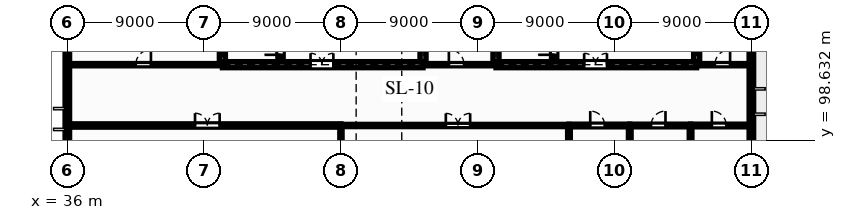
"""IFC4 building model, lengths in metres.
Left out: names, types, materials, properties, quantities, classifications, styles, units other than length and angle.
Written with IfcOpenShell. Run it as: python <this file> out.ifc"""

import sys

from ifc_helpers import new_model, si_unit, direction, frame, frame_2d, origin, place, context, subcontext, project, spatial, rectangle, extrude, element, fill, save


model = new_model("IFC4")
c1 = context("Model", 3, precision=1e-05, world=origin(), true_north=direction((0.0, 1.0)))
c2 = subcontext(c1, "Body", "Model", "MODEL_VIEW")
j1 = project(units=[si_unit("LENGTHUNIT", "METRE"), si_unit("PLANEANGLEUNIT", "RADIAN")], contexts=[c1])
p1 = place(None, origin())
s1 = spatial("IfcSite", under=j1, at=p1, CompositionType="ELEMENT")
p2 = place(p1, origin())
s2 = spatial("IfcBuilding", under=s1, at=p2, CompositionType="ELEMENT")
p3 = place(p2, frame((0.0, 0.0, 16.52)))
s3 = spatial("IfcBuildingStorey", under=s2, at=p3, CompositionType="ELEMENT", Elevation=16.52)
p4 = place(p3, frame((36.0, 90.0, 0.0), z_axis=(0.0, 0.0, 1.0), x_axis=(0.0, 1.0, 0.0)))
e1 = element("IfcWall", 1, at=p4, inside=s3, PredefinedType="SOLIDWALL", context=c2, shape_type="SweptSolid", body=[
    extrude(rectangle(XDim=24.0, YDim=0.3, at=frame_2d((12.0, 0.0))), origin(), (0.0, 0.0, 1.0), 2.785),
])
p5 = place(p4, frame((3.0, 0.0, 0.815)))
e2 = element("IfcOpeningElement", 2, at=p5, cuts=e1, PredefinedType="OPENING", context=c2, shape_type="SweptSolid", body=[
    extrude(rectangle(XDim=1.35, YDim=1.85, at=frame_2d((0.675, 0.925))), frame((0.0, 0.16, 0.0), z_axis=(0.0, -1.0, 0.0), x_axis=(1.0, 0.0, 0.0)), (0.0, 0.0, 1.0), 0.32),
])
p6 = place(p4, frame((11.7, 0.0, 0.915)))
e3 = element("IfcOpeningElement", 3, at=p6, cuts=e1, PredefinedType="OPENING", context=c2, shape_type="SweptSolid", body=[
    extrude(rectangle(XDim=1.05, YDim=1.75, at=frame_2d((0.525, 0.875))), frame((0.0, 0.16, 0.0), z_axis=(0.0, -1.0, 0.0), x_axis=(1.0, 0.0, 0.0)), (0.0, 0.0, 1.0), 0.32),
])
p7 = place(p4, frame((16.5, 0.0, 0.565)))
e4 = element("IfcOpeningElement", 4, at=p7, cuts=e1, PredefinedType="OPENING", context=c2, shape_type="SweptSolid", body=[
    extrude(rectangle(XDim=1.5, YDim=2.1, at=frame_2d((0.75, 1.05))), frame((0.0, 0.16, 0.0), z_axis=(0.0, -1.0, 0.0), x_axis=(1.0, 0.0, 0.0)), (0.0, 0.0, 1.0), 0.32),
])
p8 = place(p3, frame((81.0, 90.0, 0.0), z_axis=(0.0, 0.0, 1.0), x_axis=(0.0, 1.0, 0.0)))
e5 = element("IfcWall", 5, at=p8, inside=s3, PredefinedType="SOLIDWALL", context=c2, shape_type="SweptSolid", body=[
    extrude(rectangle(XDim=24.0, YDim=0.3, at=frame_2d((12.0, 0.0))), origin(), (0.0, 0.0, 1.0), 2.65),
])
p9 = place(p8, frame((3.2, 0.0, 0.43)))
e6 = element("IfcOpeningElement", 6, at=p9, cuts=e5, PredefinedType="OPENING", context=c2, shape_type="SweptSolid", body=[
    extrude(rectangle(XDim=1.5, YDim=2.1, at=frame_2d((0.75, 1.05))), frame((0.0, 0.16, 0.0), z_axis=(0.0, -1.0, 0.0), x_axis=(1.0, 0.0, 0.0)), (0.0, 0.0, 1.0), 0.32),
])
p10 = place(p8, frame((10.5, 0.0, 0.68)))
e7 = element("IfcOpeningElement", 7, at=p10, cuts=e5, PredefinedType="OPENING", context=c2, shape_type="SweptSolid", body=[
    extrude(rectangle(XDim=1.35, YDim=1.85, at=frame_2d((0.675, 0.925))), frame((0.0, 0.16, 0.0), z_axis=(0.0, -1.0, 0.0), x_axis=(1.0, 0.0, 0.0)), (0.0, 0.0, 1.0), 0.32),
])
p11 = place(p3, frame((46.2, 103.6, 0.0), z_axis=(0.0, 0.0, 1.0), x_axis=(1.0, 0.0, 0.0)))
e8 = element("IfcWall", 8, at=p11, inside=s3, PredefinedType="SHEAR", context=c2, shape_type="SweptSolid", body=[
    extrude(rectangle(XDim=13.2, YDim=0.4, at=frame_2d((6.6, 0.0))), origin(), (0.0, 0.0, 1.0), 3.46),
])
p12 = place(p11, frame((5.8, 0.0, 0.0)))
e9 = element("IfcOpeningElement", 9, at=p12, cuts=e8, PredefinedType="OPENING", context=c2, shape_type="SweptSolid", body=[
    extrude(rectangle(XDim=1.5, YDim=2.2, at=frame_2d((0.75, 1.1))), frame((0.0, 0.21, 0.0), z_axis=(0.0, -1.0, 0.0), x_axis=(1.0, 0.0, 0.0)), (0.0, 0.0, 1.0), 0.42),
])
for number, where, z_axis, x_axis in (
    (10, (46.2, 103.8, 0.0), (0.0, 0.0, 1.0), (0.0, 1.0, 0.0)),
    (11, (59.4, 103.8, 0.0), (0.0, 0.0, 1.0), (0.0, 1.0, 0.0)),
):
    element("IfcWall", number, at=place(p3, frame(where, z_axis=z_axis, x_axis=x_axis)), inside=s3, PredefinedType="SHEAR", context=c2, shape_type="SweptSolid", body=[
        extrude(rectangle(XDim=10.01, YDim=0.4, at=frame_2d((5.005, 0.0))), origin(), (0.0, 0.0, 1.0), 3.46),
    ])
p13 = place(p3, frame((50.025, 103.8, 0.0), z_axis=(0.0, 0.0, 1.0), x_axis=(0.0, 1.0, 0.0)))
e12 = element("IfcWall", 12, at=p13, inside=s3, PredefinedType="SHEAR", context=c2, shape_type="SweptSolid", body=[
    extrude(rectangle(XDim=10.01, YDim=0.35, at=frame_2d((5.005, 0.0))), origin(), (0.0, 0.0, 1.0), 3.46),
])
p14 = place(p13, frame((0.45, 0.0, 0.0)))
e13 = element("IfcOpeningElement", 13, at=p14, cuts=e12, PredefinedType="OPENING", context=c2, shape_type="SweptSolid", body=[
    extrude(rectangle(XDim=1.05, YDim=2.2, at=frame_2d((0.525, 1.1))), frame((0.0, 0.185, 0.0), z_axis=(0.0, -1.0, 0.0), x_axis=(1.0, 0.0, 0.0)), (0.0, 0.0, 1.0), 0.37),
])
p15 = place(p3, frame((64.2, 103.6, 0.0), z_axis=(0.0, 0.0, 1.0), x_axis=(1.0, 0.0, 0.0)))
e14 = element("IfcWall", 14, at=p15, inside=s3, PredefinedType="SHEAR", context=c2, shape_type="SweptSolid", body=[
    extrude(rectangle(XDim=13.2, YDim=0.4, at=frame_2d((6.6, 0.0))), origin(), (0.0, 0.0, 1.0), 3.46),
])
p16 = place(p15, frame((5.8, 0.0, 0.0)))
e15 = element("IfcOpeningElement", 15, at=p16, cuts=e14, PredefinedType="OPENING", context=c2, shape_type="SweptSolid", body=[
    extrude(rectangle(XDim=1.5, YDim=2.2, at=frame_2d((0.75, 1.1))), frame((0.0, 0.21, 0.0), z_axis=(0.0, -1.0, 0.0), x_axis=(1.0, 0.0, 0.0)), (0.0, 0.0, 1.0), 0.42),
])
for number, where, z_axis, x_axis in (
    (16, (64.2, 103.8, 0.0), (0.0, 0.0, 1.0), (0.0, 1.0, 0.0)),
    (17, (77.4, 103.8, 0.0), (0.0, 0.0, 1.0), (0.0, 1.0, 0.0)),
):
    element("IfcWall", number, at=place(p3, frame(where, z_axis=z_axis, x_axis=x_axis)), inside=s3, PredefinedType="SHEAR", context=c2, shape_type="SweptSolid", body=[
        extrude(rectangle(XDim=10.01, YDim=0.4, at=frame_2d((5.005, 0.0))), origin(), (0.0, 0.0, 1.0), 3.46),
    ])
p17 = place(p3, frame((68.025, 103.8, 0.0), z_axis=(0.0, 0.0, 1.0), x_axis=(0.0, 1.0, 0.0)))
e18 = element("IfcWall", 18, at=p17, inside=s3, PredefinedType="SHEAR", context=c2, shape_type="SweptSolid", body=[
    extrude(rectangle(XDim=10.01, YDim=0.35, at=frame_2d((5.005, 0.0))), origin(), (0.0, 0.0, 1.0), 3.46),
])
p18 = place(p17, frame((0.45, 0.0, 0.0)))
e19 = element("IfcOpeningElement", 19, at=p18, cuts=e18, PredefinedType="OPENING", context=c2, shape_type="SweptSolid", body=[
    extrude(rectangle(XDim=1.05, YDim=2.2, at=frame_2d((0.525, 1.1))), frame((0.0, 0.185, 0.0), z_axis=(0.0, -1.0, 0.0), x_axis=(1.0, 0.0, 0.0)), (0.0, 0.0, 1.0), 0.37),
])
p19 = place(p3, frame((36.0, 99.6, 0.0), z_axis=(0.0, 0.0, 1.0), x_axis=(1.0, 0.0, 0.0)))
e20 = element("IfcWall", 20, at=p19, inside=s3, PredefinedType="PARTITIONING", context=c2, shape_type="SweptSolid", body=[
    extrude(rectangle(XDim=18.0, YDim=0.22, at=frame_2d((9.0, 0.0))), origin(), (0.0, 0.0, 1.0), 2.65),
])
p20 = place(p19, frame((8.4, 0.0, 0.0)))
e21 = element("IfcOpeningElement", 21, at=p20, cuts=e20, PredefinedType="OPENING", context=c2, shape_type="SweptSolid", body=[
    extrude(rectangle(XDim=1.62, YDim=2.22, at=frame_2d((0.81, 1.11))), frame((0.0, 0.12, 0.0), z_axis=(0.0, -1.0, 0.0), x_axis=(1.0, 0.0, 0.0)), (0.0, 0.0, 1.0), 0.24),
])
p21 = place(p3, frame((54.0, 99.6, 0.0), z_axis=(0.0, 0.0, 1.0), x_axis=(1.0, 0.0, 0.0)))
e22 = element("IfcWall", 22, at=p21, inside=s3, PredefinedType="PARTITIONING", context=c2, shape_type="SweptSolid", body=[
    extrude(rectangle(XDim=15.0, YDim=0.15, at=frame_2d((7.5, 0.0))), origin(), (0.0, 0.0, 1.0), 3.46),
])
p22 = place(p21, frame((6.9, 0.0, 0.0)))
e23 = element("IfcOpeningElement", 23, at=p22, cuts=e22, PredefinedType="OPENING", context=c2, shape_type="SweptSolid", body=[
    extrude(rectangle(XDim=1.6, YDim=2.2, at=frame_2d((0.8, 1.1))), frame((0.0, 0.085, 0.0), z_axis=(0.0, -1.0, 0.0), x_axis=(1.0, 0.0, 0.0)), (0.0, 0.0, 1.0), 0.17),
])
p23 = place(p3, frame((54.0, 90.0, 0.0), z_axis=(0.0, 0.0, 1.0), x_axis=(0.0, 1.0, 0.0)))
e24 = element("IfcWall", 24, at=p23, inside=s3, PredefinedType="PARTITIONING", context=c2, shape_type="SweptSolid", body=[
    extrude(rectangle(XDim=9.6, YDim=0.15, at=frame_2d((4.8, 0.0))), origin(), (0.0, 0.0, 1.0), 2.65),
])
p24 = place(p3, frame((69.0, 99.6, 0.0), z_axis=(0.0, 0.0, 1.0), x_axis=(1.0, 0.0, 0.0)))
e25 = element("IfcWall", 25, at=p24, inside=s3, PredefinedType="PLUMBINGWALL", context=c2, shape_type="SweptSolid", body=[
    extrude(rectangle(XDim=4.0, YDim=0.18, at=frame_2d((2.0, 0.0))), origin(), (0.0, 0.0, 1.0), 3.46),
])
p25 = place(p24, frame((1.4, 0.0, 0.0)))
e26 = element("IfcOpeningElement", 26, at=p25, cuts=e25, PredefinedType="OPENING", context=c2, shape_type="SweptSolid", body=[
    extrude(rectangle(XDim=0.95, YDim=2.15, at=frame_2d((0.475, 1.075))), frame((0.0, 0.1, 0.0), z_axis=(0.0, -1.0, 0.0), x_axis=(1.0, 0.0, 0.0)), (0.0, 0.0, 1.0), 0.2),
])
p26 = place(p3, frame((69.0, 90.0, 0.0), z_axis=(0.0, 0.0, 1.0), x_axis=(0.0, 1.0, 0.0)))
e27 = element("IfcWall", 27, at=p26, inside=s3, PredefinedType="PLUMBINGWALL", context=c2, shape_type="SweptSolid", body=[
    extrude(rectangle(XDim=9.6, YDim=0.18, at=frame_2d((4.8, 0.0))), origin(), (0.0, 0.0, 1.0), 3.46),
])
p27 = place(p3, frame((73.0, 99.6, 0.0), z_axis=(0.0, 0.0, 1.0), x_axis=(1.0, 0.0, 0.0)))
e28 = element("IfcWall", 28, at=p27, inside=s3, PredefinedType="PLUMBINGWALL", context=c2, shape_type="SweptSolid", body=[
    extrude(rectangle(XDim=4.0, YDim=0.18, at=frame_2d((2.0, 0.0))), origin(), (0.0, 0.0, 1.0), 3.46),
])
p28 = place(p27, frame((1.4, 0.0, 0.0)))
e29 = element("IfcOpeningElement", 29, at=p28, cuts=e28, PredefinedType="OPENING", context=c2, shape_type="SweptSolid", body=[
    extrude(rectangle(XDim=0.95, YDim=2.15, at=frame_2d((0.475, 1.075))), frame((0.0, 0.1, 0.0), z_axis=(0.0, -1.0, 0.0), x_axis=(1.0, 0.0, 0.0)), (0.0, 0.0, 1.0), 0.2),
])
p29 = place(p3, frame((73.0, 90.0, 0.0), z_axis=(0.0, 0.0, 1.0), x_axis=(0.0, 1.0, 0.0)))
e30 = element("IfcWall", 30, at=p29, inside=s3, PredefinedType="PLUMBINGWALL", context=c2, shape_type="SweptSolid", body=[
    extrude(rectangle(XDim=9.6, YDim=0.18, at=frame_2d((4.8, 0.0))), origin(), (0.0, 0.0, 1.0), 3.46),
])
p30 = place(p3, frame((77.0, 99.6, 0.0), z_axis=(0.0, 0.0, 1.0), x_axis=(1.0, 0.0, 0.0)))
e31 = element("IfcWall", 31, at=p30, inside=s3, PredefinedType="PLUMBINGWALL", context=c2, shape_type="SweptSolid", body=[
    extrude(rectangle(XDim=4.0, YDim=0.18, at=frame_2d((2.0, 0.0))), origin(), (0.0, 0.0, 1.0), 3.46),
])
p31 = place(p30, frame((1.4, 0.0, 0.0)))
e32 = element("IfcOpeningElement", 32, at=p31, cuts=e31, PredefinedType="OPENING", context=c2, shape_type="SweptSolid", body=[
    extrude(rectangle(XDim=0.95, YDim=2.15, at=frame_2d((0.475, 1.075))), frame((0.0, 0.1, 0.0), z_axis=(0.0, -1.0, 0.0), x_axis=(1.0, 0.0, 0.0)), (0.0, 0.0, 1.0), 0.2),
])
p32 = place(p3, frame((77.0, 90.0, 0.0), z_axis=(0.0, 0.0, 1.0), x_axis=(0.0, 1.0, 0.0)))
e33 = element("IfcWall", 33, at=p32, inside=s3, PredefinedType="PLUMBINGWALL", context=c2, shape_type="SweptSolid", body=[
    extrude(rectangle(XDim=9.6, YDim=0.18, at=frame_2d((4.8, 0.0))), origin(), (0.0, 0.0, 1.0), 3.46),
])
p33 = place(p3, frame((36.0, 103.6, 0.0), z_axis=(0.0, 0.0, 1.0), x_axis=(1.0, 0.0, 0.0)))
e34 = element("IfcWall", 34, at=p33, inside=s3, PredefinedType="PARTITIONING", context=c2, shape_type="SweptSolid", body=[
    extrude(rectangle(XDim=10.2, YDim=0.15, at=frame_2d((5.1, 0.0))), origin(), (0.0, 0.0, 1.0), 3.46),
])
p34 = place(p33, frame((4.5, 0.0, 0.0)))
e35 = element("IfcOpeningElement", 35, at=p34, cuts=e34, PredefinedType="OPENING", context=c2, shape_type="SweptSolid", body=[
    extrude(rectangle(XDim=1.0, YDim=2.15, at=frame_2d((0.5, 1.075))), frame((0.0, 0.085, 0.0), z_axis=(0.0, -1.0, 0.0), x_axis=(1.0, 0.0, 0.0)), (0.0, 0.0, 1.0), 0.17),
])
p35 = place(p3, frame((59.4, 103.6, 0.0), z_axis=(0.0, 0.0, 1.0), x_axis=(1.0, 0.0, 0.0)))
e36 = element("IfcWall", 36, at=p35, inside=s3, PredefinedType="PARTITIONING", context=c2, shape_type="SweptSolid", body=[
    extrude(rectangle(XDim=4.8, YDim=0.15, at=frame_2d((2.4, 0.0))), origin(), (0.0, 0.0, 1.0), 3.46),
])
p36 = place(p35, frame((1.7, 0.0, 0.0)))
e37 = element("IfcOpeningElement", 37, at=p36, cuts=e36, PredefinedType="OPENING", context=c2, shape_type="SweptSolid", body=[
    extrude(rectangle(XDim=1.0, YDim=2.15, at=frame_2d((0.5, 1.075))), frame((0.0, 0.085, 0.0), z_axis=(0.0, -1.0, 0.0), x_axis=(1.0, 0.0, 0.0)), (0.0, 0.0, 1.0), 0.17),
])
p37 = place(p3, frame((77.4, 103.6, 0.0), z_axis=(0.0, 0.0, 1.0), x_axis=(1.0, 0.0, 0.0)))
e38 = element("IfcWall", 38, at=p37, inside=s3, PredefinedType="PARTITIONING", context=c2, shape_type="SweptSolid", body=[
    extrude(rectangle(XDim=3.6, YDim=0.15, at=frame_2d((1.8, 0.0))), origin(), (0.0, 0.0, 1.0), 3.46),
])
p38 = place(p37, frame((1.2, 0.0, 0.0)))
e39 = element("IfcOpeningElement", 39, at=p38, cuts=e38, PredefinedType="OPENING", context=c2, shape_type="SweptSolid", body=[
    extrude(rectangle(XDim=1.0, YDim=2.15, at=frame_2d((0.5, 1.075))), frame((0.0, 0.085, 0.0), z_axis=(0.0, -1.0, 0.0), x_axis=(1.0, 0.0, 0.0)), (0.0, 0.0, 1.0), 0.17),
])
p39 = place(p6, origin())
e40 = element("IfcWindow", 40, at=p39, inside=s3, PartitioningType="SINGLE_PANEL", PredefinedType="WINDOW", context=c2, shape_type="SweptSolid", body=[
    extrude(rectangle(XDim=1.05, YDim=1.75, at=frame_2d((0.525, 0.875))), frame((0.0, 0.03, 0.0), z_axis=(0.0, -1.0, 0.0), x_axis=(1.0, 0.0, 0.0)), (0.0, 0.0, 1.0), 0.06),
])
fill(e3, e40)
p40 = place(p10, origin())
e41 = element("IfcWindow", 41, at=p40, inside=s3, PartitioningType="SINGLE_PANEL", PredefinedType="WINDOW", context=c2, shape_type="SweptSolid", body=[
    extrude(rectangle(XDim=1.35, YDim=1.85, at=frame_2d((0.675, 0.925))), frame((0.0, 0.03, 0.0), z_axis=(0.0, -1.0, 0.0), x_axis=(1.0, 0.0, 0.0)), (0.0, 0.0, 1.0), 0.06),
])
fill(e7, e41)
p41 = place(p12, origin())
e42 = element("IfcDoor", 42, at=p41, inside=s3, OperationType="DOUBLE_DOOR_SINGLE_SWING", PredefinedType="DOOR", context=c2, shape_type="SweptSolid", body=[
    extrude(rectangle(XDim=1.5, YDim=2.2, at=frame_2d((0.75, 1.1))), frame((0.0, 0.025, 0.0), z_axis=(0.0, -1.0, 0.0), x_axis=(1.0, 0.0, 0.0)), (0.0, 0.0, 1.0), 0.05),
])
fill(e9, e42)
p42 = place(p14, origin())
e43 = element("IfcDoor", 43, at=p42, inside=s3, OperationType="SINGLE_SWING_LEFT", PredefinedType="DOOR", context=c2, shape_type="SweptSolid", body=[
    extrude(rectangle(XDim=1.05, YDim=2.2, at=frame_2d((0.525, 1.1))), frame((0.0, 0.025, 0.0), z_axis=(0.0, -1.0, 0.0), x_axis=(1.0, 0.0, 0.0)), (0.0, 0.0, 1.0), 0.05),
])
fill(e13, e43)
p43 = place(p16, origin())
e44 = element("IfcDoor", 44, at=p43, inside=s3, OperationType="DOUBLE_DOOR_SINGLE_SWING", PredefinedType="DOOR", context=c2, shape_type="SweptSolid", body=[
    extrude(rectangle(XDim=1.5, YDim=2.2, at=frame_2d((0.75, 1.1))), frame((0.0, 0.025, 0.0), z_axis=(0.0, -1.0, 0.0), x_axis=(1.0, 0.0, 0.0)), (0.0, 0.0, 1.0), 0.05),
])
fill(e15, e44)
p44 = place(p18, origin())
e45 = element("IfcDoor", 45, at=p44, inside=s3, OperationType="SINGLE_SWING_LEFT", PredefinedType="DOOR", context=c2, shape_type="SweptSolid", body=[
    extrude(rectangle(XDim=1.05, YDim=2.2, at=frame_2d((0.525, 1.1))), frame((0.0, 0.025, 0.0), z_axis=(0.0, -1.0, 0.0), x_axis=(1.0, 0.0, 0.0)), (0.0, 0.0, 1.0), 0.05),
])
fill(e19, e45)
p45 = place(p20, origin())
e46 = element("IfcDoor", 46, at=p45, inside=s3, OperationType="DOUBLE_DOOR_SINGLE_SWING", PredefinedType="DOOR", context=c2, shape_type="SweptSolid", body=[
    extrude(rectangle(XDim=1.62, YDim=2.22, at=frame_2d((0.81, 1.11))), frame((0.0, 0.025, 0.0), z_axis=(0.0, -1.0, 0.0), x_axis=(1.0, 0.0, 0.0)), (0.0, 0.0, 1.0), 0.05),
])
fill(e21, e46)
p46 = place(p22, origin())
e47 = element("IfcDoor", 47, at=p46, inside=s3, OperationType="DOUBLE_DOOR_SINGLE_SWING", PredefinedType="DOOR", context=c2, shape_type="SweptSolid", body=[
    extrude(rectangle(XDim=1.6, YDim=2.2, at=frame_2d((0.8, 1.1))), frame((0.0, 0.025, 0.0), z_axis=(0.0, -1.0, 0.0), x_axis=(1.0, 0.0, 0.0)), (0.0, 0.0, 1.0), 0.05),
])
fill(e23, e47)
p47 = place(p25, origin())
e48 = element("IfcDoor", 48, at=p47, inside=s3, OperationType="SINGLE_SWING_LEFT", PredefinedType="DOOR", context=c2, shape_type="SweptSolid", body=[
    extrude(rectangle(XDim=0.95, YDim=2.15, at=frame_2d((0.475, 1.075))), frame((0.0, 0.025, 0.0), z_axis=(0.0, -1.0, 0.0), x_axis=(1.0, 0.0, 0.0)), (0.0, 0.0, 1.0), 0.05),
])
fill(e26, e48)
p48 = place(p28, origin())
e49 = element("IfcDoor", 49, at=p48, inside=s3, OperationType="SINGLE_SWING_RIGHT", PredefinedType="DOOR", context=c2, shape_type="SweptSolid", body=[
    extrude(rectangle(XDim=0.95, YDim=2.15, at=frame_2d((0.475, 1.075))), frame((0.0, 0.025, 0.0), z_axis=(0.0, -1.0, 0.0), x_axis=(1.0, 0.0, 0.0)), (0.0, 0.0, 1.0), 0.05),
])
fill(e29, e49)
p49 = place(p31, origin())
e50 = element("IfcDoor", 50, at=p49, inside=s3, OperationType="SINGLE_SWING_LEFT", PredefinedType="DOOR", context=c2, shape_type="SweptSolid", body=[
    extrude(rectangle(XDim=0.95, YDim=2.15, at=frame_2d((0.475, 1.075))), frame((0.0, 0.025, 0.0), z_axis=(0.0, -1.0, 0.0), x_axis=(1.0, 0.0, 0.0)), (0.0, 0.0, 1.0), 0.05),
])
fill(e32, e50)
p50 = place(p34, origin())
e51 = element("IfcDoor", 51, at=p50, inside=s3, OperationType="SINGLE_SWING_RIGHT", PredefinedType="DOOR", context=c2, shape_type="SweptSolid", body=[
    extrude(rectangle(XDim=1.0, YDim=2.15, at=frame_2d((0.5, 1.075))), frame((0.0, 0.025, 0.0), z_axis=(0.0, -1.0, 0.0), x_axis=(1.0, 0.0, 0.0)), (0.0, 0.0, 1.0), 0.05),
])
fill(e35, e51)
p51 = place(p36, origin())
e52 = element("IfcDoor", 52, at=p51, inside=s3, OperationType="SINGLE_SWING_LEFT", PredefinedType="DOOR", context=c2, shape_type="SweptSolid", body=[
    extrude(rectangle(XDim=1.0, YDim=2.15, at=frame_2d((0.5, 1.075))), frame((0.0, 0.025, 0.0), z_axis=(0.0, -1.0, 0.0), x_axis=(1.0, 0.0, 0.0)), (0.0, 0.0, 1.0), 0.05),
])
fill(e37, e52)
p52 = place(p38, origin())
e53 = element("IfcDoor", 53, at=p52, inside=s3, OperationType="SINGLE_SWING_RIGHT", PredefinedType="DOOR", context=c2, shape_type="SweptSolid", body=[
    extrude(rectangle(XDim=1.0, YDim=2.15, at=frame_2d((0.5, 1.075))), frame((0.0, 0.025, 0.0), z_axis=(0.0, -1.0, 0.0), x_axis=(1.0, 0.0, 0.0)), (0.0, 0.0, 1.0), 0.05),
])
fill(e39, e53)
save(model, sys.argv[1])
